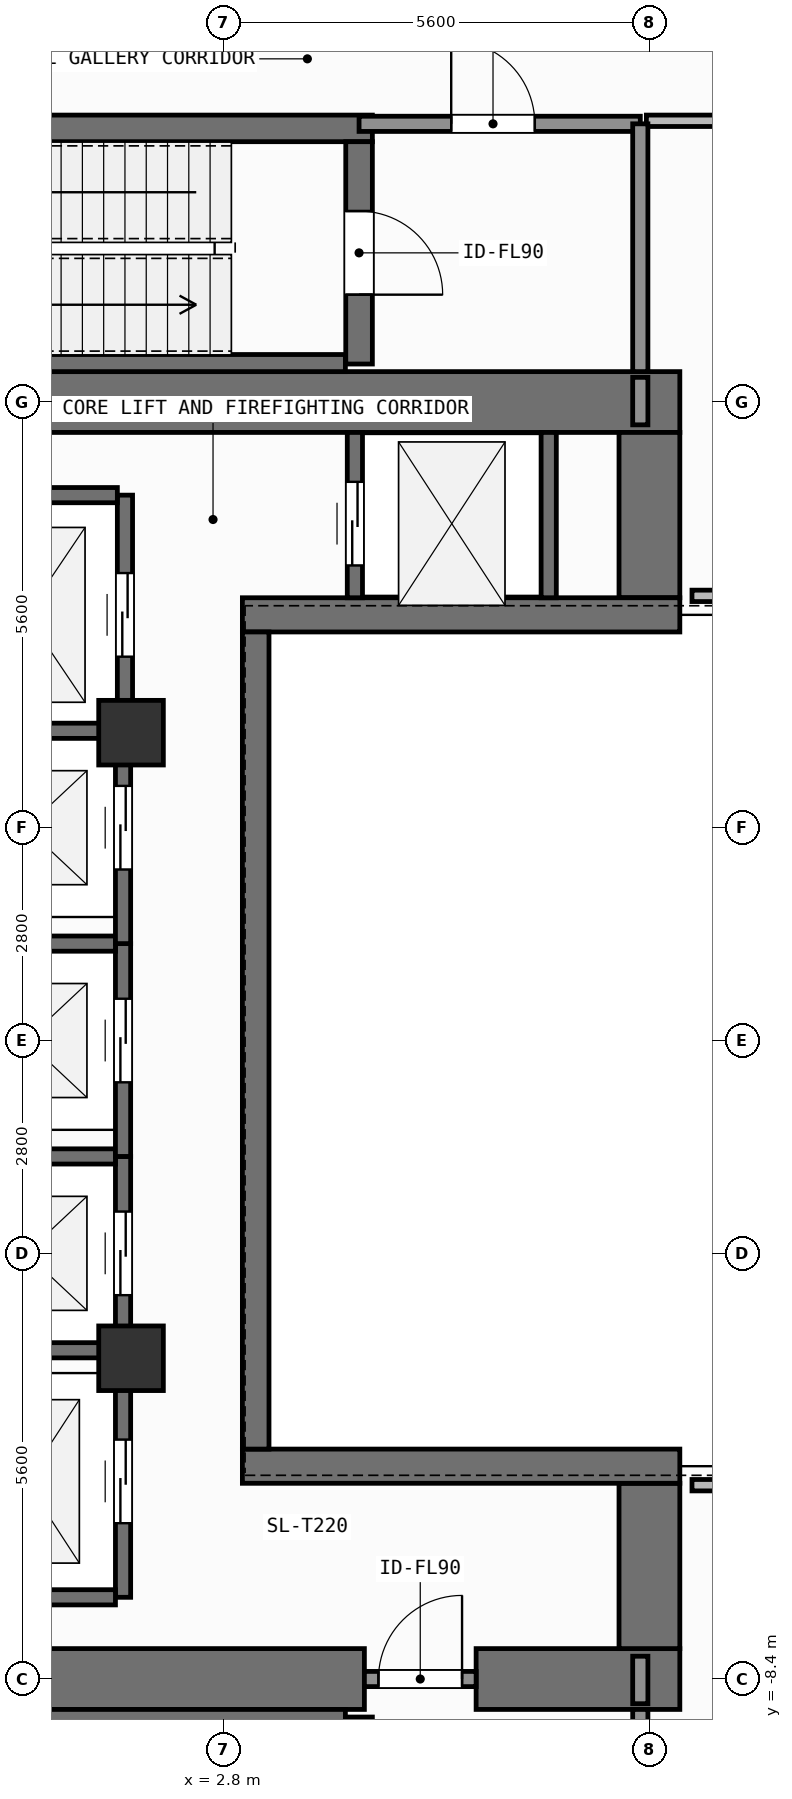
"""IFC4 building model, lengths in metres.
Left out: names, types, materials, properties, quantities, classifications, styles, units other than length and angle.
Written with IfcOpenShell. Run it as: python <this file> out.ifc"""

import sys

from ifc_helpers import new_model, si_unit, direction, frame, frame_2d, origin, origin_2d, place, context, subcontext, project, spatial, rectangle, extrude, element, fill, save


model = new_model("IFC4")
c1 = context("Model", 3, precision=1e-05, world=origin(), true_north=direction((0.0, 1.0)))
c2 = subcontext(c1, "Body", "Model", "MODEL_VIEW")
j1 = project(units=[si_unit("LENGTHUNIT", "METRE"), si_unit("PLANEANGLEUNIT", "RADIAN")], contexts=[c1])
p1 = place(None, origin())
s1 = spatial("IfcSite", under=j1, at=p1, CompositionType="ELEMENT")
p2 = place(p1, origin())
s2 = spatial("IfcBuilding", under=s1, at=p2, CompositionType="ELEMENT")
p3 = place(p2, frame((0.0, 0.0, 223.5)))
s3 = spatial("IfcBuildingStorey", under=s2, at=p3, CompositionType="ELEMENT", Elevation=223.5)
p4 = place(p3, frame((-2.62, -8.4, 0.0), z_axis=(0.0, 0.0, 1.0), x_axis=(1.0, 0.0, 0.0)))
e1 = element("IfcWall", 1, at=p4, inside=s3, PredefinedType="SHEAR", context=c2, shape_type="SweptSolid", body=[
    extrude(rectangle(XDim=7.27, YDim=0.8, at=frame_2d((3.635, 0.0))), origin(), (0.0, 0.0, 1.0), 3.9),
])
p5 = place(p3, frame((6.12, -8.4, 0.0), z_axis=(0.0, 0.0, 1.0), x_axis=(1.0, 0.0, 0.0)))
e2 = element("IfcWall", 2, at=p5, inside=s3, PredefinedType="SHEAR", context=c2, shape_type="SweptSolid", body=[
    extrude(rectangle(XDim=2.68, YDim=0.8, at=frame_2d((1.34, 0.0))), origin(), (0.0, 0.0, 1.0), 3.9),
])
p6 = place(p3, frame((-7.55, 8.4, 0.0), z_axis=(0.0, 0.0, 1.0), x_axis=(1.0, 0.0, 0.0)))
e3 = element("IfcWall", 3, at=p6, inside=s3, PredefinedType="SHEAR", context=c2, shape_type="SweptSolid", body=[
    extrude(rectangle(XDim=16.35, YDim=0.8, at=frame_2d((8.175, 0.0))), origin(), (0.0, 0.0, 1.0), 3.9),
])
for number, where, z_axis, x_axis in (
    (4, (8.4, -8.0, 0.0), (0.0, 0.0, 1.0), (0.0, 1.0, 0.0)),
    (5, (8.4, 5.825, 0.0), (0.0, 0.0, 1.0), (0.0, 1.0, 0.0)),
):
    element("IfcWall", number, at=place(p3, frame(where, z_axis=z_axis, x_axis=x_axis)), inside=s3, PredefinedType="SHEAR", context=c2, shape_type="SweptSolid", body=[
        extrude(rectangle(XDim=2.175, YDim=0.8, at=frame_2d((1.087, 0.0))), origin(), (0.0, 0.0, 1.0), 3.9),
    ])
for number, where, z_axis, x_axis in (
    (6, (3.045, -5.6, 0.0), (0.0, 0.0, 1.0), (1.0, 0.0, 0.0)),
    (7, (3.045, 5.6, 0.0), (0.0, 0.0, 1.0), (1.0, 0.0, 0.0)),
):
    element("IfcWall", number, at=place(p3, frame(where, z_axis=z_axis, x_axis=x_axis)), inside=s3, PredefinedType="SHEAR", context=c2, shape_type="SweptSolid", body=[
        extrude(rectangle(XDim=5.755, YDim=0.45, at=frame_2d((2.877, 0.0))), origin(), (0.0, 0.0, 1.0), 3.9),
    ])
p7 = place(p3, frame((3.22, -5.375, 0.0), z_axis=(0.0, 0.0, 1.0), x_axis=(0.0, 1.0, 0.0)))
e8 = element("IfcWall", 8, at=p7, inside=s3, PredefinedType="SHEAR", context=c2, shape_type="SweptSolid", body=[
    extrude(rectangle(XDim=10.75, YDim=0.35, at=frame_2d((5.375, 0.0))), origin(), (0.0, 0.0, 1.0), 3.9),
])
p8 = place(p3, frame((-2.2, -8.913, 0.0), z_axis=(0.0, 0.0, 1.0), x_axis=(1.0, 0.0, 0.0)))
e9 = element("IfcWall", 9, at=p8, inside=s3, PredefinedType="SHEAR", context=c2, shape_type="SweptSolid", body=[
    extrude(rectangle(XDim=6.6, YDim=0.225, at=frame_2d((3.3, 0.0))), origin(), (0.0, 0.0, 1.0), 3.9),
])
p9 = place(p3, frame((4.58, -8.9, 0.0), z_axis=(0.0, 0.0, 1.0), x_axis=(0.0, -1.0, 0.0)))
e10 = element("IfcWall", 10, at=p9, inside=s3, PredefinedType="SHEAR", context=c2, shape_type="SweptSolid", body=[
    extrude(rectangle(XDim=2.925, YDim=0.35, at=frame_2d((1.462, 0.0))), origin(), (0.0, 0.0, 1.0), 3.9),
])
p10 = place(p9, frame((0.913, 0.0, 0.0)))
e11 = element("IfcOpeningElement", 11, at=p10, cuts=e10, PredefinedType="OPENING", context=c2, shape_type="SweptSolid", body=[
    extrude(rectangle(XDim=1.1, YDim=2.15, at=frame_2d((0.55, 1.075))), frame((0.0, 0.185, 0.0), z_axis=(0.0, -1.0, 0.0), x_axis=(1.0, 0.0, 0.0)), (0.0, 0.0, 1.0), 0.37),
])
p11 = place(p3, frame((-2.555, 12.0, 0.0), z_axis=(0.0, 0.0, 1.0), x_axis=(1.0, 0.0, 0.0)))
e12 = element("IfcWall", 12, at=p11, inside=s3, PredefinedType="SHEAR", context=c2, shape_type="SweptSolid", body=[
    extrude(rectangle(XDim=7.31, YDim=0.35, at=frame_2d((3.655, 0.0))), origin(), (0.0, 0.0, 1.0), 3.9),
])
p12 = place(p3, frame((-2.2, 8.913, 0.0), z_axis=(0.0, 0.0, 1.0), x_axis=(1.0, 0.0, 0.0)))
e13 = element("IfcWall", 13, at=p12, inside=s3, PredefinedType="SHEAR", context=c2, shape_type="SweptSolid", body=[
    extrude(rectangle(XDim=6.6, YDim=0.225, at=frame_2d((3.3, 0.0))), origin(), (0.0, 0.0, 1.0), 3.9),
])
p13 = place(p3, frame((4.58, 11.825, 0.0), z_axis=(0.0, 0.0, 1.0), x_axis=(0.0, -1.0, 0.0)))
e14 = element("IfcWall", 14, at=p13, inside=s3, PredefinedType="SHEAR", context=c2, shape_type="SweptSolid", body=[
    extrude(rectangle(XDim=2.925, YDim=0.35, at=frame_2d((1.462, 0.0))), origin(), (0.0, 0.0, 1.0), 3.9),
])
p14 = place(p13, frame((0.913, 0.0, 0.0)))
e15 = element("IfcOpeningElement", 15, at=p14, cuts=e14, PredefinedType="OPENING", context=c2, shape_type="SweptSolid", body=[
    extrude(rectangle(XDim=1.1, YDim=2.15, at=frame_2d((0.55, 1.075))), frame((0.0, 0.185, 0.0), z_axis=(0.0, -1.0, 0.0), x_axis=(1.0, 0.0, 0.0)), (0.0, 0.0, 1.0), 0.37),
])
for number, where, z_axis, x_axis in (
    (16, (1.58, -4.18, 0.0), (0.0, 0.0, 1.0), (1.0, 0.0, 0.0)),
    (17, (1.58, 4.05, 0.0), (0.0, 0.0, 1.0), (1.0, 0.0, 0.0)),
):
    element("IfcColumn", number, at=place(p3, frame(where, z_axis=z_axis, x_axis=x_axis)), inside=s3, PredefinedType="COLUMN", context=c2, shape_type="SweptSolid", body=[
        extrude(rectangle(XDim=0.85, YDim=0.85, at=origin_2d()), origin(), (0.0, 0.0, 1.0), 3.9),
    ])
p15 = place(p3, frame((1.475, -4.275, 0.0), z_axis=(0.0, 0.0, 1.0), x_axis=(0.0, 1.0, 0.0)))
e18 = element("IfcWall", 18, at=p15, inside=s3, PredefinedType="SHEAR", context=c2, shape_type="SweptSolid", body=[
    extrude(rectangle(XDim=2.75, YDim=0.2, at=frame_2d((1.375, 0.0))), origin(), (0.0, 0.0, 1.0), 3.68),
])
p16 = place(p15, frame((0.925, 0.0, 0.0)))
e19 = element("IfcOpeningElement", 19, at=p16, cuts=e18, PredefinedType="OPENING", context=c2, shape_type="SweptSolid", body=[
    extrude(rectangle(XDim=1.1, YDim=2.2, at=frame_2d((0.55, 1.1))), frame((0.0, 0.11, 0.0), z_axis=(0.0, -1.0, 0.0), x_axis=(1.0, 0.0, 0.0)), (0.0, 0.0, 1.0), 0.22),
])
for number, where, z_axis, x_axis in (
    (20, (-0.975, -4.075, 0.0), (0.0, 0.0, 1.0), (1.0, 0.0, 0.0)),
    (21, (-0.975, -1.525, 0.0), (0.0, 0.0, 1.0), (1.0, 0.0, 0.0)),
):
    element("IfcWall", number, at=place(p3, frame(where, z_axis=z_axis, x_axis=x_axis)), inside=s3, PredefinedType="SHEAR", context=c2, shape_type="SweptSolid", body=[
        extrude(rectangle(XDim=2.35, YDim=0.2, at=frame_2d((1.175, 0.0))), origin(), (0.0, 0.0, 1.0), 3.68),
    ])
p17 = place(p3, frame((1.475, -1.525, 0.0), z_axis=(0.0, 0.0, 1.0), x_axis=(0.0, 1.0, 0.0)))
e22 = element("IfcWall", 22, at=p17, inside=s3, PredefinedType="SHEAR", context=c2, shape_type="SweptSolid", body=[
    extrude(rectangle(XDim=2.8, YDim=0.2, at=frame_2d((1.4, 0.0))), origin(), (0.0, 0.0, 1.0), 3.68),
])
p18 = place(p17, frame((0.975, 0.0, 0.0)))
e23 = element("IfcOpeningElement", 23, at=p18, cuts=e22, PredefinedType="OPENING", context=c2, shape_type="SweptSolid", body=[
    extrude(rectangle(XDim=1.1, YDim=2.2, at=frame_2d((0.55, 1.1))), frame((0.0, 0.11, 0.0), z_axis=(0.0, -1.0, 0.0), x_axis=(1.0, 0.0, 0.0)), (0.0, 0.0, 1.0), 0.22),
])
p19 = place(p3, frame((-0.975, 1.275, 0.0), z_axis=(0.0, 0.0, 1.0), x_axis=(1.0, 0.0, 0.0)))
e24 = element("IfcWall", 24, at=p19, inside=s3, PredefinedType="SHEAR", context=c2, shape_type="SweptSolid", body=[
    extrude(rectangle(XDim=2.35, YDim=0.2, at=frame_2d((1.175, 0.0))), origin(), (0.0, 0.0, 1.0), 3.68),
])
p20 = place(p3, frame((1.475, 1.275, 0.0), z_axis=(0.0, 0.0, 1.0), x_axis=(0.0, 1.0, 0.0)))
e25 = element("IfcWall", 25, at=p20, inside=s3, PredefinedType="SHEAR", context=c2, shape_type="SweptSolid", body=[
    extrude(rectangle(XDim=2.8, YDim=0.2, at=frame_2d((1.4, 0.0))), origin(), (0.0, 0.0, 1.0), 3.68),
])
p21 = place(p20, frame((0.975, 0.0, 0.0)))
e26 = element("IfcOpeningElement", 26, at=p21, cuts=e25, PredefinedType="OPENING", context=c2, shape_type="SweptSolid", body=[
    extrude(rectangle(XDim=1.1, YDim=2.2, at=frame_2d((0.55, 1.1))), frame((0.0, 0.11, 0.0), z_axis=(0.0, -1.0, 0.0), x_axis=(1.0, 0.0, 0.0)), (0.0, 0.0, 1.0), 0.22),
])
p22 = place(p3, frame((-0.975, 4.075, 0.0), z_axis=(0.0, 0.0, 1.0), x_axis=(1.0, 0.0, 0.0)))
e27 = element("IfcWall", 27, at=p22, inside=s3, PredefinedType="SHEAR", context=c2, shape_type="SweptSolid", body=[
    extrude(rectangle(XDim=2.35, YDim=0.2, at=frame_2d((1.175, 0.0))), origin(), (0.0, 0.0, 1.0), 3.68),
])
p23 = place(p3, frame((1.5, 4.025, 0.0), z_axis=(0.0, 0.0, 1.0), x_axis=(0.0, 1.0, 0.0)))
e28 = element("IfcWall", 28, at=p23, inside=s3, PredefinedType="SHEAR", context=c2, shape_type="SweptSolid", body=[
    extrude(rectangle(XDim=3.15, YDim=0.2, at=frame_2d((1.575, 0.0))), origin(), (0.0, 0.0, 1.0), 3.68),
])
p24 = place(p23, frame((1.025, 0.0, 0.0)))
e29 = element("IfcOpeningElement", 29, at=p24, cuts=e28, PredefinedType="OPENING", context=c2, shape_type="SweptSolid", body=[
    extrude(rectangle(XDim=1.1, YDim=2.2, at=frame_2d((0.55, 1.1))), frame((0.0, 0.11, 0.0), z_axis=(0.0, -1.0, 0.0), x_axis=(1.0, 0.0, 0.0)), (0.0, 0.0, 1.0), 0.22),
])
p25 = place(p3, frame((-1.0, 7.175, 0.0), z_axis=(0.0, 0.0, 1.0), x_axis=(1.0, 0.0, 0.0)))
e30 = element("IfcWall", 30, at=p25, inside=s3, PredefinedType="SHEAR", context=c2, shape_type="SweptSolid", body=[
    extrude(rectangle(XDim=2.4, YDim=0.2, at=frame_2d((1.2, 0.0))), origin(), (0.0, 0.0, 1.0), 3.68),
])
p26 = place(p3, frame((1.475, -7.325, 0.0), z_axis=(0.0, 0.0, 1.0), x_axis=(0.0, 1.0, 0.0)))
e31 = element("IfcWall", 31, at=p26, inside=s3, PredefinedType="SHEAR", context=c2, shape_type="SweptSolid", body=[
    extrude(rectangle(XDim=3.05, YDim=0.2, at=frame_2d((1.525, 0.0))), origin(), (0.0, 0.0, 1.0), 3.68),
])
p27 = place(p26, frame((0.975, 0.0, 0.0)))
e32 = element("IfcOpeningElement", 32, at=p27, cuts=e31, PredefinedType="OPENING", context=c2, shape_type="SweptSolid", body=[
    extrude(rectangle(XDim=1.1, YDim=2.2, at=frame_2d((0.55, 1.1))), frame((0.0, 0.11, 0.0), z_axis=(0.0, -1.0, 0.0), x_axis=(1.0, 0.0, 0.0)), (0.0, 0.0, 1.0), 0.22),
])
p28 = place(p3, frame((-0.975, -7.325, 0.0), z_axis=(0.0, 0.0, 1.0), x_axis=(1.0, 0.0, 0.0)))
e33 = element("IfcWall", 33, at=p28, inside=s3, PredefinedType="SHEAR", context=c2, shape_type="SweptSolid", body=[
    extrude(rectangle(XDim=2.35, YDim=0.2, at=frame_2d((1.175, 0.0))), origin(), (0.0, 0.0, 1.0), 3.68),
])
p29 = place(p3, frame((4.525, 5.825, 0.0), z_axis=(0.0, 0.0, 1.0), x_axis=(0.0, 1.0, 0.0)))
e34 = element("IfcWall", 34, at=p29, inside=s3, PredefinedType="SHEAR", context=c2, shape_type="SweptSolid", body=[
    extrude(rectangle(XDim=2.175, YDim=0.2, at=frame_2d((1.087, 0.0))), origin(), (0.0, 0.0, 1.0), 3.68),
])
p30 = place(p29, frame((0.425, 0.0, 0.0)))
e35 = element("IfcOpeningElement", 35, at=p30, cuts=e34, PredefinedType="OPENING", context=c2, shape_type="SweptSolid", body=[
    extrude(rectangle(XDim=1.1, YDim=2.2, at=frame_2d((0.55, 1.1))), frame((0.0, 0.11, 0.0), z_axis=(0.0, -1.0, 0.0), x_axis=(1.0, 0.0, 0.0)), (0.0, 0.0, 1.0), 0.22),
])
p31 = place(p3, frame((7.075, 5.825, 0.0), z_axis=(0.0, 0.0, 1.0), x_axis=(0.0, 1.0, 0.0)))
e36 = element("IfcWall", 36, at=p31, inside=s3, PredefinedType="SHEAR", context=c2, shape_type="SweptSolid", body=[
    extrude(rectangle(XDim=2.175, YDim=0.2, at=frame_2d((1.087, 0.0))), origin(), (0.0, 0.0, 1.0), 3.68),
])
p32 = place(p3, frame((4.65, -8.4, 0.0), z_axis=(0.0, 0.0, 1.0), x_axis=(1.0, 0.0, 0.0)))
e37 = element("IfcWall", 37, at=p32, inside=s3, PredefinedType="SOLIDWALL", context=c2, shape_type="SweptSolid", body=[
    extrude(rectangle(XDim=1.47, YDim=0.2, at=frame_2d((0.735, 0.0))), origin(), (0.0, 0.0, 1.0), 2.82),
])
p33 = place(p32, frame((0.185, 0.0, 0.0)))
e38 = element("IfcOpeningElement", 38, at=p33, cuts=e37, PredefinedType="OPENING", context=c2, shape_type="SweptSolid", body=[
    extrude(rectangle(XDim=1.1, YDim=2.15, at=frame_2d((0.55, 1.075))), frame((0.0, 0.11, 0.0), z_axis=(0.0, -1.0, 0.0), x_axis=(1.0, 0.0, 0.0)), (0.0, 0.0, 1.0), 0.22),
])
p34 = place(p3, frame((4.58, 12.06, 0.0), z_axis=(0.0, 0.0, 1.0), x_axis=(1.0, 0.0, 0.0)))
e39 = element("IfcWall", 39, at=p34, inside=s3, PredefinedType="SOLIDWALL", context=c2, shape_type="SweptSolid", body=[
    extrude(rectangle(XDim=3.7, YDim=0.2, at=frame_2d((1.85, 0.0))), origin(), (0.0, 0.0, 1.0), 3.68),
])
p35 = place(p34, frame((1.212, 0.0, 0.0)))
e40 = element("IfcOpeningElement", 40, at=p35, cuts=e39, PredefinedType="OPENING", context=c2, shape_type="SweptSolid", body=[
    extrude(rectangle(XDim=1.1, YDim=2.15, at=frame_2d((0.55, 1.075))), frame((0.0, 0.11, 0.0), z_axis=(0.0, -1.0, 0.0), x_axis=(1.0, 0.0, 0.0)), (0.0, 0.0, 1.0), 0.22),
])
p36 = place(p3, frame((8.36, 12.1, 0.0), z_axis=(0.0, 0.0, 1.0), x_axis=(1.0, 0.0, 0.0)))
e41 = element("IfcWall", 41, at=p36, inside=s3, PredefinedType="PARTITIONING", context=c2, shape_type="SweptSolid", body=[
    extrude(rectangle(XDim=7.22, YDim=0.15, at=frame_2d((3.61, 0.0))), origin(), (0.0, 0.0, 1.0), 3.68),
])
p37 = place(p36, frame((3.513, 0.0, 0.0)))
e42 = element("IfcOpeningElement", 42, at=p37, cuts=e41, PredefinedType="OPENING", context=c2, shape_type="SweptSolid", body=[
    extrude(rectangle(XDim=0.9, YDim=2.1, at=frame_2d((0.45, 1.05))), frame((0.0, 0.085, 0.0), z_axis=(0.0, -1.0, 0.0), x_axis=(1.0, 0.0, 0.0)), (0.0, 0.0, 1.0), 0.17),
])
for number, where, z_axis, x_axis in (
    (43, (8.28, -12.06, 0.0), (0.0, 0.0, 1.0), (0.0, 1.0, 0.0)),
    (44, (8.28, 8.8, 0.0), (0.0, 0.0, 1.0), (0.0, 1.0, 0.0)),
):
    element("IfcWall", number, at=place(p3, frame(where, z_axis=z_axis, x_axis=x_axis)), inside=s3, PredefinedType="SOLIDWALL", context=c2, shape_type="SweptSolid", body=[
        extrude(rectangle(XDim=3.26, YDim=0.2, at=frame_2d((1.63, 0.0))), origin(), (0.0, 0.0, 1.0), 3.68),
    ])
p38 = place(p3, frame((8.28, -8.725, 0.0), z_axis=(0.0, 0.0, 1.0), x_axis=(0.0, 1.0, 0.0)))
e45 = element("IfcWall", 45, at=p38, inside=s3, PredefinedType="SOLIDWALL", context=c2, shape_type="SweptSolid", body=[
    extrude(rectangle(XDim=0.625, YDim=0.2, at=frame_2d((0.312, 0.0))), origin(), (0.0, 0.0, 1.0), 3.68),
])
p39 = place(p3, frame((8.96, -5.85, 0.0), z_axis=(0.0, 0.0, 1.0), x_axis=(1.0, 0.0, 0.0)))
e46 = element("IfcWall", 46, at=p39, inside=s3, PredefinedType="PARTITIONING", context=c2, shape_type="SweptSolid", body=[
    extrude(rectangle(XDim=6.62, YDim=0.15, at=frame_2d((3.31, 0.0))), origin(), (0.0, 0.0, 1.0), 3.68),
])
p40 = place(p3, frame((8.28, 8.1, 0.0), z_axis=(0.0, 0.0, 1.0), x_axis=(0.0, 1.0, 0.0)))
e47 = element("IfcWall", 47, at=p40, inside=s3, PredefinedType="SOLIDWALL", context=c2, shape_type="SweptSolid", body=[
    extrude(rectangle(XDim=0.625, YDim=0.2, at=frame_2d((0.312, 0.0))), origin(), (0.0, 0.0, 1.0), 3.68),
])
p41 = place(p3, frame((8.96, 5.85, 0.0), z_axis=(0.0, 0.0, 1.0), x_axis=(1.0, 0.0, 0.0)))
e48 = element("IfcWall", 48, at=p41, inside=s3, PredefinedType="PARTITIONING", context=c2, shape_type="SweptSolid", body=[
    extrude(rectangle(XDim=6.62, YDim=0.15, at=frame_2d((3.31, 0.0))), origin(), (0.0, 0.0, 1.0), 3.68),
])
p42 = place(p16, origin())
e49 = element("IfcDoor", 49, at=p42, inside=s3, OperationType="SLIDING_TO_LEFT", PredefinedType="DOOR", context=c2, shape_type="SweptSolid", body=[
    extrude(rectangle(XDim=1.1, YDim=2.2, at=frame_2d((0.55, 1.1))), frame((0.0, 0.025, 0.0), z_axis=(0.0, -1.0, 0.0), x_axis=(1.0, 0.0, 0.0)), (0.0, 0.0, 1.0), 0.05),
])
fill(e19, e49)
p43 = place(p18, origin())
e50 = element("IfcDoor", 50, at=p43, inside=s3, OperationType="SLIDING_TO_LEFT", PredefinedType="DOOR", context=c2, shape_type="SweptSolid", body=[
    extrude(rectangle(XDim=1.1, YDim=2.2, at=frame_2d((0.55, 1.1))), frame((0.0, 0.025, 0.0), z_axis=(0.0, -1.0, 0.0), x_axis=(1.0, 0.0, 0.0)), (0.0, 0.0, 1.0), 0.05),
])
fill(e23, e50)
p44 = place(p21, origin())
e51 = element("IfcDoor", 51, at=p44, inside=s3, OperationType="SLIDING_TO_LEFT", PredefinedType="DOOR", context=c2, shape_type="SweptSolid", body=[
    extrude(rectangle(XDim=1.1, YDim=2.2, at=frame_2d((0.55, 1.1))), frame((0.0, 0.025, 0.0), z_axis=(0.0, -1.0, 0.0), x_axis=(1.0, 0.0, 0.0)), (0.0, 0.0, 1.0), 0.05),
])
fill(e26, e51)
p45 = place(p24, origin())
e52 = element("IfcDoor", 52, at=p45, inside=s3, OperationType="SLIDING_TO_LEFT", PredefinedType="DOOR", context=c2, shape_type="SweptSolid", body=[
    extrude(rectangle(XDim=1.1, YDim=2.2, at=frame_2d((0.55, 1.1))), frame((0.0, 0.025, 0.0), z_axis=(0.0, -1.0, 0.0), x_axis=(1.0, 0.0, 0.0)), (0.0, 0.0, 1.0), 0.05),
])
fill(e29, e52)
p46 = place(p27, origin())
e53 = element("IfcDoor", 53, at=p46, inside=s3, OperationType="SLIDING_TO_LEFT", PredefinedType="DOOR", context=c2, shape_type="SweptSolid", body=[
    extrude(rectangle(XDim=1.1, YDim=2.2, at=frame_2d((0.55, 1.1))), frame((0.0, 0.025, 0.0), z_axis=(0.0, -1.0, 0.0), x_axis=(1.0, 0.0, 0.0)), (0.0, 0.0, 1.0), 0.05),
])
fill(e32, e53)
p47 = place(p30, origin())
e54 = element("IfcDoor", 54, at=p47, inside=s3, OperationType="SLIDING_TO_LEFT", PredefinedType="DOOR", context=c2, shape_type="SweptSolid", body=[
    extrude(rectangle(XDim=1.1, YDim=2.2, at=frame_2d((0.55, 1.1))), frame((0.0, 0.025, 0.0), z_axis=(0.0, -1.0, 0.0), x_axis=(1.0, 0.0, 0.0)), (0.0, 0.0, 1.0), 0.05),
])
fill(e35, e54)
p48 = place(p14, origin())
e55 = element("IfcDoor", 55, at=p48, inside=s3, OperationType="SINGLE_SWING_RIGHT", PredefinedType="DOOR", context=c2, shape_type="SweptSolid", body=[
    extrude(rectangle(XDim=1.1, YDim=2.15, at=frame_2d((0.55, 1.075))), frame((0.0, 0.025, 0.0), z_axis=(0.0, -1.0, 0.0), x_axis=(1.0, 0.0, 0.0)), (0.0, 0.0, 1.0), 0.05),
])
fill(e15, e55)
p49 = place(p33, origin())
e56 = element("IfcDoor", 56, at=p49, inside=s3, OperationType="SINGLE_SWING_RIGHT", PredefinedType="DOOR", context=c2, shape_type="SweptSolid", body=[
    extrude(rectangle(XDim=1.1, YDim=2.15, at=frame_2d((0.55, 1.075))), frame((0.0, 0.025, 0.0), z_axis=(0.0, -1.0, 0.0), x_axis=(1.0, 0.0, 0.0)), (0.0, 0.0, 1.0), 0.05),
])
fill(e38, e56)
p50 = place(p35, origin())
e57 = element("IfcDoor", 57, at=p50, inside=s3, OperationType="SINGLE_SWING_LEFT", PredefinedType="DOOR", context=c2, shape_type="SweptSolid", body=[
    extrude(rectangle(XDim=1.1, YDim=2.15, at=frame_2d((0.55, 1.075))), frame((0.0, 0.025, 0.0), z_axis=(0.0, -1.0, 0.0), x_axis=(1.0, 0.0, 0.0)), (0.0, 0.0, 1.0), 0.05),
])
fill(e40, e57)
save(model, sys.argv[1])
